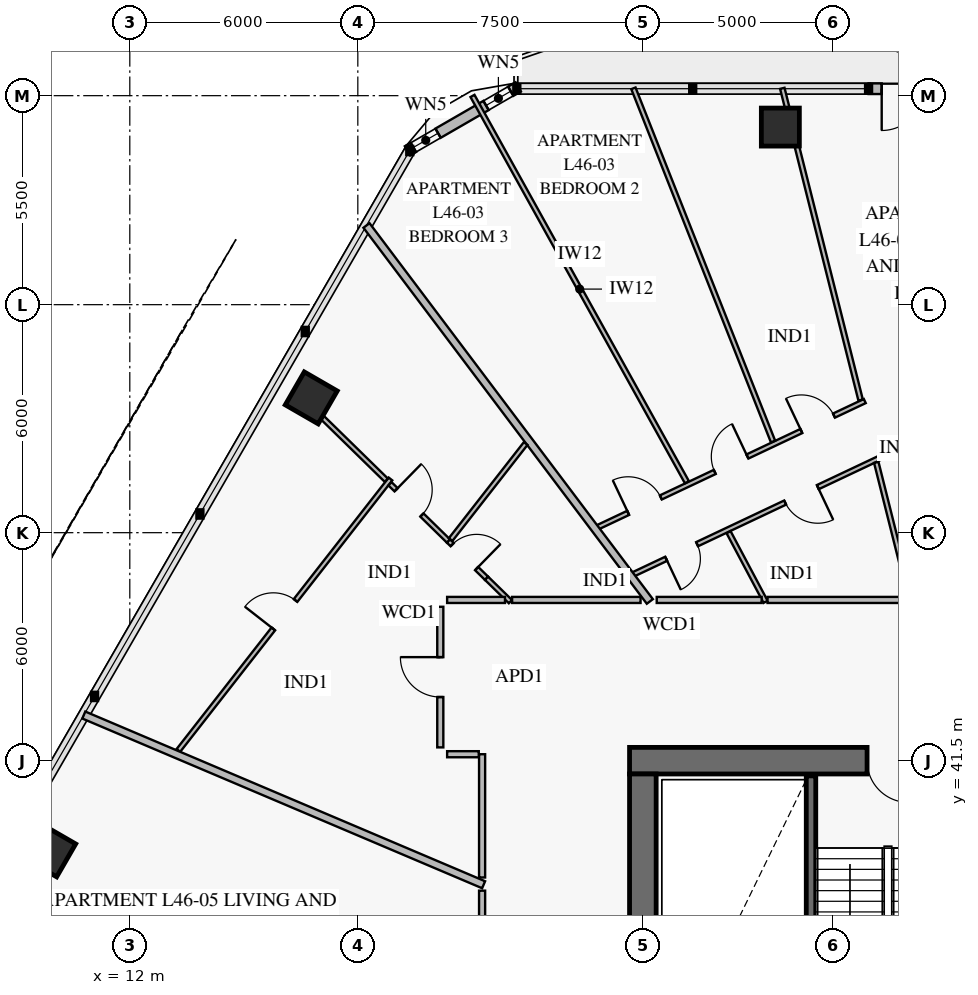
"""IFC4 building model, lengths in metres.
Left out: names, types, materials, properties, quantities, classifications, styles, units other than length and angle.
Written with IfcOpenShell. Run it as: python <this file> out.ifc"""

import sys

from ifc_helpers import new_model, si_unit, direction, frame, frame_2d, origin, origin_2d, place, context, subcontext, project, spatial, rectangle, extrude, element, fill, save


model = new_model("IFC4")
c1 = context("Model", 3, precision=1e-05, world=origin(), true_north=direction((0.0, 1.0)))
c2 = subcontext(c1, "Body", "Model", "MODEL_VIEW")
j1 = project(units=[si_unit("LENGTHUNIT", "METRE"), si_unit("PLANEANGLEUNIT", "RADIAN")], contexts=[c1])
p1 = place(None, origin())
s1 = spatial("IfcSite", under=j1, at=p1, CompositionType="ELEMENT")
p2 = place(p1, origin())
s2 = spatial("IfcBuilding", under=s1, at=p2, CompositionType="ELEMENT")
p3 = place(p2, frame((0.0, 0.0, 184.6)))
s3 = spatial("IfcBuildingStorey", under=s2, at=p3, CompositionType="ELEMENT", Elevation=184.6)
p4 = place(p3, frame((36.75, 41.5, 0.0), z_axis=(0.0, 0.0, 1.0), x_axis=(-1.0, 0.0, 0.0)))
e1 = element("IfcWall", 1, at=p4, inside=s3, PredefinedType="SHEAR", context=c2, shape_type="SweptSolid", body=[
    extrude(rectangle(XDim=11.6, YDim=0.7, at=frame_2d((5.8, 0.0))), origin(), (0.0, 0.0, 1.0), 3.8),
])
p5 = place(p4, frame((4.25, 0.0, 0.0)))
e2 = element("IfcOpeningElement", 2, at=p5, cuts=e1, PredefinedType="OPENING", context=c2, shape_type="SweptSolid", body=[
    extrude(rectangle(XDim=1.1, YDim=2.15, at=frame_2d((0.55, 1.075))), frame((0.0, 0.362, 0.0), z_axis=(0.0, -1.0, 0.0), x_axis=(1.0, 0.0, 0.0)), (0.0, 0.0, 1.0), 0.724),
])
p6 = place(p3, frame((25.5, 22.85, 0.0), z_axis=(0.0, 0.0, 1.0), x_axis=(0.0, 1.0, 0.0)))
e3 = element("IfcWall", 3, at=p6, inside=s3, PredefinedType="SHEAR", context=c2, shape_type="SweptSolid", body=[
    extrude(rectangle(XDim=18.3, YDim=0.7, at=frame_2d((9.15, 0.0))), origin(), (0.0, 0.0, 1.0), 3.8),
])
p7 = place(p6, frame((8.9, 0.0, 0.0)))
e4 = element("IfcOpeningElement", 4, at=p7, cuts=e3, PredefinedType="OPENING", context=c2, shape_type="SweptSolid", body=[
    extrude(rectangle(XDim=1.1, YDim=2.15, at=frame_2d((0.55, 1.075))), frame((0.0, 0.362, 0.0), z_axis=(0.0, -1.0, 0.0), x_axis=(1.0, 0.0, 0.0)), (0.0, 0.0, 1.0), 0.724),
])
for number, where, z_axis, x_axis in (
    (5, (29.118, 58.173, 0.0), (0.0, 0.0, 1.0), (-1.0, 0.0, 0.0)),
    (6, (16.774, 51.047, 0.0), (0.0, 0.0, 1.0), (-0.5, -0.866, 0.0)),
    (7, (9.892, 39.126, 0.0), (0.0, 0.0, 1.0), (-0.5, -0.866, 0.0)),
):
    element("IfcColumn", number, at=place(p3, frame(where, z_axis=z_axis, x_axis=x_axis)), inside=s3, PredefinedType="COLUMN", context=c2, shape_type="SweptSolid", body=[
        extrude(rectangle(XDim=1.0, YDim=1.0, at=origin_2d()), origin(), (0.0, 0.0, 1.0), 3.55),
    ])
p8 = place(p3, frame((19.307, 57.548, 0.0), z_axis=(0.0, 0.0, 1.0), x_axis=(0.866020068361, 0.500009241111, 0.0)))
e8 = element("IfcWall", 8, at=p8, inside=s3, PredefinedType="SOLIDWALL", context=c2, shape_type="SweptSolid", body=[
    extrude(rectangle(XDim=3.365, YDim=0.28, at=frame_2d((1.683, 0.0))), origin(), (0.0, 0.0, 1.0), 3.55),
])
p9 = place(p8, frame((2.387, 0.0, 0.85)))
e9 = element("IfcOpeningElement", 9, at=p9, cuts=e8, PredefinedType="OPENING", context=c2, shape_type="SweptSolid", body=[
    extrude(rectangle(XDim=0.75, YDim=1.5, at=frame_2d((0.375, 0.75))), frame((0.0, 0.152, 0.0), z_axis=(0.0, -1.0, 0.0), x_axis=(1.0, 0.0, 0.0)), (0.0, 0.0, 1.0), 0.304),
])
p10 = place(p8, frame((0.179, 0.0, 0.85)))
e10 = element("IfcOpeningElement", 10, at=p10, cuts=e8, PredefinedType="OPENING", context=c2, shape_type="SweptSolid", body=[
    extrude(rectangle(XDim=0.75, YDim=1.5, at=frame_2d((0.375, 0.75))), frame((0.0, 0.152, 0.0), z_axis=(0.0, -1.0, 0.0), x_axis=(1.0, 0.0, 0.0)), (0.0, 0.0, 1.0), 0.304),
])
p11 = place(p3, frame((31.44, 59.183, 0.0), z_axis=(0.0, 0.0, 1.0), x_axis=(1.0, 0.0, 0.0)))
e11 = element("IfcWall", 11, at=p11, inside=s3, PredefinedType="SOLIDWALL", context=c2, shape_type="SweptSolid", body=[
    extrude(rectangle(XDim=1.79, YDim=0.28, at=frame_2d((0.895, 0.0))), origin(), (0.0, 0.0, 1.0), 3.55),
])
p12 = place(p11, frame((0.345, 0.0, 0.0)))
e12 = element("IfcOpeningElement", 12, at=p12, cuts=e11, PredefinedType="OPENING", context=c2, shape_type="SweptSolid", body=[
    extrude(rectangle(XDim=1.1, YDim=2.2, at=frame_2d((0.55, 1.1))), frame((0.0, 0.152, 0.0), z_axis=(0.0, -1.0, 0.0), x_axis=(1.0, 0.0, 0.0)), (0.0, 0.0, 1.0), 0.304),
])
p13 = place(p3, frame((29.925, 31.4, 0.0), z_axis=(0.0, 0.0, 1.0), x_axis=(0.0, 1.0, 0.0)))
e13 = element("IfcWall", 13, at=p13, inside=s3, PredefinedType="SOLIDWALL", context=c2, shape_type="SweptSolid", body=[
    extrude(rectangle(XDim=9.7, YDim=0.25, at=frame_2d((4.85, 0.0))), origin(), (0.0, 0.0, 1.0), 3.8),
])
p14 = place(p3, frame((31.717, 49.461, 0.0), z_axis=(0.0, 0.0, 1.0), x_axis=(-0.904083014939, -0.427356879081, 0.0)))
e14 = element("IfcWall", 14, at=p14, inside=s3, PredefinedType="PARTITIONING", context=c2, shape_type="SweptSolid", body=[
    extrude(rectangle(XDim=7.18, YDim=0.12, at=frame_2d((3.59, 0.0))), origin(), (0.0, 0.0, 1.0), 2.9),
])
p15 = place(p14, frame((1.785, 0.0, 0.0)))
e15 = element("IfcOpeningElement", 15, at=p15, cuts=e14, PredefinedType="OPENING", context=c2, shape_type="SweptSolid", body=[
    extrude(rectangle(XDim=0.95, YDim=2.1, at=frame_2d((0.475, 1.05))), frame((0.0, 0.072, 0.0), z_axis=(0.0, -1.0, 0.0), x_axis=(1.0, 0.0, 0.0)), (0.0, 0.0, 1.0), 0.144),
])
p16 = place(p14, frame((5.298, 0.0, 0.0)))
e16 = element("IfcOpeningElement", 16, at=p16, cuts=e14, PredefinedType="OPENING", context=c2, shape_type="SweptSolid", body=[
    extrude(rectangle(XDim=0.9, YDim=2.1, at=frame_2d((0.45, 1.05))), frame((0.0, 0.072, 0.0), z_axis=(0.0, -1.0, 0.0), x_axis=(1.0, 0.0, 0.0)), (0.0, 0.0, 1.0), 0.144),
])
p17 = place(p3, frame((31.34, 50.964, 0.0), z_axis=(0.0, 0.0, 1.0), x_axis=(-0.904072927677, -0.427378218258, 0.0)))
e17 = element("IfcWall", 17, at=p17, inside=s3, PredefinedType="PARTITIONING", context=c2, shape_type="SweptSolid", body=[
    extrude(rectangle(XDim=7.782, YDim=0.12, at=frame_2d((3.891, 0.0))), origin(), (0.0, 0.0, 1.0), 2.9),
])
p18 = place(p17, frame((0.896, 0.0, 0.0)))
e18 = element("IfcOpeningElement", 18, at=p18, cuts=e17, PredefinedType="OPENING", context=c2, shape_type="SweptSolid", body=[
    extrude(rectangle(XDim=0.95, YDim=2.1, at=frame_2d((0.475, 1.05))), frame((0.0, 0.072, 0.0), z_axis=(0.0, -1.0, 0.0), x_axis=(1.0, 0.0, 0.0)), (0.0, 0.0, 1.0), 0.144),
])
p19 = place(p17, frame((3.416, 0.0, 0.0)))
e19 = element("IfcOpeningElement", 19, at=p19, cuts=e17, PredefinedType="OPENING", context=c2, shape_type="SweptSolid", body=[
    extrude(rectangle(XDim=0.95, YDim=2.1, at=frame_2d((0.475, 1.05))), frame((0.0, 0.072, 0.0), z_axis=(0.0, -1.0, 0.0), x_axis=(1.0, 0.0, 0.0)), (0.0, 0.0, 1.0), 0.144),
])
p20 = place(p17, frame((5.936, 0.0, 0.0)))
e20 = element("IfcOpeningElement", 20, at=p20, cuts=e17, PredefinedType="OPENING", context=c2, shape_type="SweptSolid", body=[
    extrude(rectangle(XDim=0.95, YDim=2.1, at=frame_2d((0.475, 1.05))), frame((0.0, 0.072, 0.0), z_axis=(0.0, -1.0, 0.0), x_axis=(1.0, 0.0, 0.0)), (0.0, 0.0, 1.0), 0.144),
])
p21 = place(p3, frame((18.86, 48.913, 0.0), z_axis=(0.0, 0.0, 1.0), x_axis=(-0.615647177954, -0.788021923729, 0.0)))
e21 = element("IfcWall", 21, at=p21, inside=s3, PredefinedType="PARTITIONING", context=c2, shape_type="SweptSolid", body=[
    extrude(rectangle(XDim=9.064, YDim=0.12, at=frame_2d((4.532, 0.0))), origin(), (0.0, 0.0, 1.0), 2.9),
])
p22 = place(p21, frame((4.057, 0.0, 0.0)))
e22 = element("IfcOpeningElement", 22, at=p22, cuts=e21, PredefinedType="OPENING", context=c2, shape_type="SweptSolid", body=[
    extrude(rectangle(XDim=0.95, YDim=2.1, at=frame_2d((0.475, 1.05))), frame((0.0, 0.072, 0.0), z_axis=(0.0, -1.0, 0.0), x_axis=(1.0, 0.0, 0.0)), (0.0, 0.0, 1.0), 0.144),
])
p23 = place(p3, frame((21.387, 46.3, 0.0), z_axis=(0.0, 0.0, 1.0), x_axis=(-0.714709414699, 0.699421512781, 0.0)))
e23 = element("IfcWall", 23, at=p23, inside=s3, PredefinedType="PARTITIONING", context=c2, shape_type="SweptSolid", body=[
    extrude(rectangle(XDim=1.405, YDim=0.12, at=frame_2d((0.703, 0.0))), origin(), (0.0, 0.0, 1.0), 2.9),
])
p24 = place(p23, frame((0.365, 0.0, 0.0)))
e24 = element("IfcOpeningElement", 24, at=p24, cuts=e23, PredefinedType="OPENING", context=c2, shape_type="SweptSolid", body=[
    extrude(rectangle(XDim=0.9, YDim=2.1, at=frame_2d((0.45, 1.05))), frame((0.0, 0.072, 0.0), z_axis=(0.0, -1.0, 0.0), x_axis=(1.0, 0.0, 0.0)), (0.0, 0.0, 1.0), 0.144),
])
p25 = place(p3, frame((20.383, 47.283, 0.0), z_axis=(0.0, 0.0, 1.0), x_axis=(-0.714732795813, 0.699397619806, 0.0)))
e25 = element("IfcWall", 25, at=p25, inside=s3, PredefinedType="PARTITIONING", context=c2, shape_type="SweptSolid", body=[
    extrude(rectangle(XDim=2.149, YDim=0.12, at=frame_2d((1.075, 0.0))), origin(), (0.0, 0.0, 1.0), 2.9),
])
p26 = place(p25, frame((0.975, 0.0, 0.0)))
e26 = element("IfcOpeningElement", 26, at=p26, cuts=e25, PredefinedType="OPENING", context=c2, shape_type="SweptSolid", body=[
    extrude(rectangle(XDim=0.95, YDim=2.1, at=frame_2d((0.475, 1.05))), frame((0.0, 0.072, 0.0), z_axis=(0.0, -1.0, 0.0), x_axis=(1.0, 0.0, 0.0)), (0.0, 0.0, 1.0), 0.144),
])
p27 = place(p3, frame((18.749, 48.882, 0.0), z_axis=(0.0, 0.0, 1.0), x_axis=(-0.714696370735, 0.69943484161, 0.0)))
e27 = element("IfcWall", 27, at=p27, inside=s3, PredefinedType="PARTITIONING", context=c2, shape_type="SweptSolid", body=[
    extrude(rectangle(XDim=2.352, YDim=0.12, at=frame_2d((1.176, 0.0))), origin(), (0.0, 0.0, 1.0), 2.9),
])
p28 = place(p3, frame((20.17, 45.55, 0.0), z_axis=(0.0, 0.0, 1.0), x_axis=(0.0, -1.0, 0.0)))
e28 = element("IfcWall", 28, at=p28, inside=s3, PredefinedType="PARTITIONING", context=c2, shape_type="SweptSolid", body=[
    extrude(rectangle(XDim=3.7, YDim=0.16, at=frame_2d((1.85, 0.0))), origin(), (0.0, 0.0, 1.0), 3.15),
])
p29 = place(p28, frame((1.325, 0.0, 0.0)))
e29 = element("IfcOpeningElement", 29, at=p29, cuts=e28, PredefinedType="OPENING", context=c2, shape_type="SweptSolid", body=[
    extrude(rectangle(XDim=1.05, YDim=2.15, at=frame_2d((0.525, 1.075))), frame((0.0, 0.092, 0.0), z_axis=(0.0, -1.0, 0.0), x_axis=(1.0, 0.0, 0.0)), (0.0, 0.0, 1.0), 0.184),
])
p30 = place(p3, frame((21.27, 38.08, 0.0), z_axis=(0.0, 0.0, 1.0), x_axis=(0.0, -1.0, 0.0)))
e30 = element("IfcWall", 30, at=p30, inside=s3, PredefinedType="PARTITIONING", context=c2, shape_type="SweptSolid", body=[
    extrude(rectangle(XDim=3.679, YDim=0.16, at=frame_2d((1.839, 0.0))), origin(), (0.0, 0.0, 1.0), 2.9),
])
p31 = place(p30, frame((1.314, 0.0, 0.0)))
e31 = element("IfcOpeningElement", 31, at=p31, cuts=e30, PredefinedType="OPENING", context=c2, shape_type="SweptSolid", body=[
    extrude(rectangle(XDim=1.05, YDim=2.15, at=frame_2d((0.525, 1.075))), frame((0.0, 0.092, 0.0), z_axis=(0.0, -1.0, 0.0), x_axis=(1.0, 0.0, 0.0)), (0.0, 0.0, 1.0), 0.184),
])
p32 = place(p3, frame((28.73, 45.68, 0.0), z_axis=(0.0, 0.0, 1.0), x_axis=(-0.469275581214, 0.883051770213, 0.0)))
e32 = element("IfcWall", 32, at=p32, inside=s3, PredefinedType="PARTITIONING", context=c2, shape_type="SweptSolid", body=[
    extrude(rectangle(XDim=2.076, YDim=0.12, at=frame_2d((1.038, 0.0))), origin(), (0.0, 0.0, 1.0), 3.55),
])
p33 = place(p3, frame((28.926, 49.898, 0.0), z_axis=(0.0, 0.0, 1.0), x_axis=(-0.367601408751, 0.929983443016, 0.0)))
e33 = element("IfcWall", 33, at=p33, inside=s3, PredefinedType="PARTITIONING", context=c2, shape_type="SweptSolid", body=[
    extrude(rectangle(XDim=9.995, YDim=0.12, at=frame_2d((4.997, 0.0))), origin(), (0.0, 0.0, 1.0), 2.87),
])
p34 = place(p3, frame((26.66, 48.827, 0.0), z_axis=(0.0, 0.0, 1.0), x_axis=(-0.485325552843, 0.874333522037, 0.0)))
e34 = element("IfcWall", 34, at=p34, inside=s3, PredefinedType="PARTITIONING", context=c2, shape_type="SweptSolid", body=[
    extrude(rectangle(XDim=11.627, YDim=0.12, at=frame_2d((5.813, 0.0))), origin(), (0.0, 0.0, 1.0), 2.87),
])
p35 = place(p3, frame((32.564, 45.681, 0.0), z_axis=(0.0, 0.0, 1.0), x_axis=(-0.24365901467, 0.969860961463, 0.0)))
e35 = element("IfcWall", 35, at=p35, inside=s3, PredefinedType="PARTITIONING", context=c2, shape_type="SweptSolid", body=[
    extrude(rectangle(XDim=3.783, YDim=0.12, at=frame_2d((1.892, 0.0))), origin(), (0.0, 0.0, 1.0), 2.9),
])
p36 = place(p3, frame((31.231, 50.988, 0.0), z_axis=(0.0, 0.0, 1.0), x_axis=(-0.243630476545, 0.969868130675, 0.0)))
e36 = element("IfcWall", 36, at=p36, inside=s3, PredefinedType="PARTITIONING", context=c2, shape_type="SweptSolid", body=[
    extrude(rectangle(XDim=6.872, YDim=0.12, at=frame_2d((3.436, 0.0))), origin(), (0.0, 0.0, 1.0), 2.9),
])
p37 = place(p3, frame((29.295, 58.693, 0.0), z_axis=(0.0, 0.0, 1.0), x_axis=(-0.243426992513, 0.969919223088, 0.0)))
e37 = element("IfcWall", 37, at=p37, inside=s3, PredefinedType="PARTITIONING", context=c2, shape_type="SweptSolid", body=[
    extrude(rectangle(XDim=0.516, YDim=0.12, at=frame_2d((0.258, 0.0))), origin(), (0.0, 0.0, 1.0), 3.55),
])
p38 = place(p3, frame((25.684, 45.69, 0.0), z_axis=(0.0, 0.0, 1.0), x_axis=(-0.601811441108, 0.798638209299, 0.0)))
e38 = element("IfcWall", 38, at=p38, inside=s3, PredefinedType="PARTITIONING", context=c2, shape_type="SweptSolid", body=[
    extrude(rectangle(XDim=12.389, YDim=0.2, at=frame_2d((6.194, 0.0))), origin(), (0.0, 0.0, 1.0), 2.87),
])
p39 = place(p3, frame((22.016, 45.685, 0.0), z_axis=(0.0, 0.0, 1.0), x_axis=(-0.714701250038, 0.699429855807, 0.0)))
e39 = element("IfcWall", 39, at=p39, inside=s3, PredefinedType="PARTITIONING", context=c2, shape_type="SweptSolid", body=[
    extrude(rectangle(XDim=0.879, YDim=0.12, at=frame_2d((0.44, 0.0))), origin(), (0.0, 0.0, 1.0), 2.9),
])
p40 = place(p3, frame((22.417, 49.846, 0.0), z_axis=(0.0, 0.0, 1.0), x_axis=(-0.615599713935, -0.788059002996, 0.0)))
e40 = element("IfcWall", 40, at=p40, inside=s3, PredefinedType="PARTITIONING", context=c2, shape_type="SweptSolid", body=[
    extrude(rectangle(XDim=3.207, YDim=0.12, at=frame_2d((1.603, 0.0))), origin(), (0.0, 0.0, 1.0), 2.9),
])
p41 = place(p3, frame((21.31, 38.236, 0.0), z_axis=(0.0, 0.0, 1.0), x_axis=(-0.920512876962, 0.390712225746, 0.0)))
e41 = element("IfcWall", 41, at=p41, inside=s3, PredefinedType="PARTITIONING", context=c2, shape_type="SweptSolid", body=[
    extrude(rectangle(XDim=11.429, YDim=0.2, at=frame_2d((5.714, 0.0))), origin(), (0.0, 0.0, 1.0), 2.87),
])
p42 = place(p3, frame((32.481, 45.73, 0.0), z_axis=(0.0, 0.0, 1.0), x_axis=(-1.0, 0.0, 0.0)))
e42 = element("IfcWall", 42, at=p42, inside=s3, PredefinedType="PARTITIONING", context=c2, shape_type="SweptSolid", body=[
    extrude(rectangle(XDim=3.701, YDim=0.16, at=frame_2d((1.851, 0.0))), origin(), (0.0, 0.0, 1.0), 2.9),
])
p43 = place(p3, frame((28.626, 45.73, 0.0), z_axis=(0.0, 0.0, 1.0), x_axis=(-1.0, 0.0, 0.0)))
e43 = element("IfcWall", 43, at=p43, inside=s3, PredefinedType="PARTITIONING", context=c2, shape_type="SweptSolid", body=[
    extrude(rectangle(XDim=2.761, YDim=0.16, at=frame_2d((1.38, 0.0))), origin(), (0.0, 0.0, 1.0), 3.55),
])
p44 = place(p3, frame((21.27, 41.67, 0.0), z_axis=(0.0, 0.0, 1.0), x_axis=(0.0, -1.0, 0.0)))
e44 = element("IfcWall", 44, at=p44, inside=s3, PredefinedType="PARTITIONING", context=c2, shape_type="SweptSolid", body=[
    extrude(rectangle(XDim=3.243, YDim=0.16, at=frame_2d((1.622, 0.0))), origin(), (0.0, 0.0, 1.0), 3.55),
])
p45 = place(p3, frame((21.872, 45.73, 0.0), z_axis=(0.0, 0.0, 1.0), x_axis=(-1.0, 0.0, 0.0)))
e45 = element("IfcWall", 45, at=p45, inside=s3, PredefinedType="PARTITIONING", context=c2, shape_type="SweptSolid", body=[
    extrude(rectangle(XDim=1.522, YDim=0.16, at=frame_2d((0.761, 0.0))), origin(), (0.0, 0.0, 1.0), 3.15),
])
p46 = place(p3, frame((20.35, 41.67, 0.0), z_axis=(0.0, 0.0, 1.0), x_axis=(1.0, 0.0, 0.0)))
e46 = element("IfcWall", 46, at=p46, inside=s3, PredefinedType="PARTITIONING", context=c2, shape_type="SweptSolid", body=[
    extrude(rectangle(XDim=0.832, YDim=0.16, at=frame_2d((0.416, 0.0))), origin(), (0.0, 0.0, 1.0), 3.55),
])
p47 = place(p3, frame((25.439, 45.73, 0.0), z_axis=(0.0, 0.0, 1.0), x_axis=(-1.0, 0.0, 0.0)))
e47 = element("IfcWall", 47, at=p47, inside=s3, PredefinedType="PARTITIONING", context=c2, shape_type="SweptSolid", body=[
    extrude(rectangle(XDim=3.38, YDim=0.16, at=frame_2d((1.69, 0.0))), origin(), (0.0, 0.0, 1.0), 2.9),
])
p48 = place(p9, origin())
e48 = element("IfcWindow", 48, at=p48, inside=s3, PartitioningType="SINGLE_PANEL", PredefinedType="WINDOW", context=c2, shape_type="SweptSolid", body=[
    extrude(rectangle(XDim=0.75, YDim=1.5, at=frame_2d((0.375, 0.75))), frame((0.0, 0.03, 0.0), z_axis=(0.0, -1.0, 0.0), x_axis=(1.0, 0.0, 0.0)), (0.0, 0.0, 1.0), 0.06),
])
fill(e9, e48)
p49 = place(p10, origin())
e49 = element("IfcWindow", 49, at=p49, inside=s3, PartitioningType="SINGLE_PANEL", PredefinedType="WINDOW", context=c2, shape_type="SweptSolid", body=[
    extrude(rectangle(XDim=0.75, YDim=1.5, at=frame_2d((0.375, 0.75))), frame((0.0, 0.03, 0.0), z_axis=(0.0, -1.0, 0.0), x_axis=(1.0, 0.0, 0.0)), (0.0, 0.0, 1.0), 0.06),
])
fill(e10, e49)
p50 = place(p12, frame((1.1, 0.0, 0.0), z_axis=(0.0, 0.0, 1.0), x_axis=(-1.0, 0.0, 0.0)))
e50 = element("IfcDoor", 50, at=p50, inside=s3, OperationType="SINGLE_SWING_RIGHT", PredefinedType="DOOR", context=c2, shape_type="SweptSolid", body=[
    extrude(rectangle(XDim=1.1, YDim=2.2, at=frame_2d((0.55, 1.1))), frame((0.0, 0.025, 0.0), z_axis=(0.0, -1.0, 0.0), x_axis=(1.0, 0.0, 0.0)), (0.0, 0.0, 1.0), 0.05),
])
fill(e12, e50)
p51 = place(p5, origin())
e51 = element("IfcDoor", 51, at=p51, inside=s3, OperationType="SINGLE_SWING_LEFT", PredefinedType="USERDEFINED", context=c2, shape_type="SweptSolid", body=[
    extrude(rectangle(XDim=1.1, YDim=2.15, at=frame_2d((0.55, 1.075))), frame((0.0, 0.025, 0.0), z_axis=(0.0, -1.0, 0.0), x_axis=(1.0, 0.0, 0.0)), (0.0, 0.0, 1.0), 0.05),
])
fill(e2, e51)
p52 = place(p15, origin())
e52 = element("IfcDoor", 52, at=p52, inside=s3, OperationType="SINGLE_SWING_LEFT", PredefinedType="DOOR", context=c2, shape_type="SweptSolid", body=[
    extrude(rectangle(XDim=0.95, YDim=2.1, at=frame_2d((0.475, 1.05))), frame((0.0, 0.025, 0.0), z_axis=(0.0, -1.0, 0.0), x_axis=(1.0, 0.0, 0.0)), (0.0, 0.0, 1.0), 0.05),
])
fill(e15, e52)
p53 = place(p16, origin())
e53 = element("IfcDoor", 53, at=p53, inside=s3, OperationType="SINGLE_SWING_RIGHT", PredefinedType="DOOR", context=c2, shape_type="SweptSolid", body=[
    extrude(rectangle(XDim=0.9, YDim=2.1, at=frame_2d((0.45, 1.05))), frame((0.0, 0.025, 0.0), z_axis=(0.0, -1.0, 0.0), x_axis=(1.0, 0.0, 0.0)), (0.0, 0.0, 1.0), 0.05),
])
fill(e16, e53)
p54 = place(p18, frame((0.95, 0.0, 0.0), z_axis=(0.0, 0.0, 1.0), x_axis=(-1.0, 0.0, 0.0)))
e54 = element("IfcDoor", 54, at=p54, inside=s3, OperationType="SINGLE_SWING_LEFT", PredefinedType="DOOR", context=c2, shape_type="SweptSolid", body=[
    extrude(rectangle(XDim=0.95, YDim=2.1, at=frame_2d((0.475, 1.05))), frame((0.0, 0.025, 0.0), z_axis=(0.0, -1.0, 0.0), x_axis=(1.0, 0.0, 0.0)), (0.0, 0.0, 1.0), 0.05),
])
fill(e18, e54)
p55 = place(p19, frame((0.95, 0.0, 0.0), z_axis=(0.0, 0.0, 1.0), x_axis=(-1.0, 0.0, 0.0)))
e55 = element("IfcDoor", 55, at=p55, inside=s3, OperationType="SINGLE_SWING_RIGHT", PredefinedType="DOOR", context=c2, shape_type="SweptSolid", body=[
    extrude(rectangle(XDim=0.95, YDim=2.1, at=frame_2d((0.475, 1.05))), frame((0.0, 0.025, 0.0), z_axis=(0.0, -1.0, 0.0), x_axis=(1.0, 0.0, 0.0)), (0.0, 0.0, 1.0), 0.05),
])
fill(e19, e55)
p56 = place(p20, frame((0.95, 0.0, 0.0), z_axis=(0.0, 0.0, 1.0), x_axis=(-1.0, 0.0, 0.0)))
e56 = element("IfcDoor", 56, at=p56, inside=s3, OperationType="SINGLE_SWING_LEFT", PredefinedType="DOOR", context=c2, shape_type="SweptSolid", body=[
    extrude(rectangle(XDim=0.95, YDim=2.1, at=frame_2d((0.475, 1.05))), frame((0.0, 0.025, 0.0), z_axis=(0.0, -1.0, 0.0), x_axis=(1.0, 0.0, 0.0)), (0.0, 0.0, 1.0), 0.05),
])
fill(e20, e56)
p57 = place(p22, frame((0.95, 0.0, 0.0), z_axis=(0.0, 0.0, 1.0), x_axis=(-1.0, 0.0, 0.0)))
e57 = element("IfcDoor", 57, at=p57, inside=s3, OperationType="SINGLE_SWING_LEFT", PredefinedType="DOOR", context=c2, shape_type="SweptSolid", body=[
    extrude(rectangle(XDim=0.95, YDim=2.1, at=frame_2d((0.475, 1.05))), frame((0.0, 0.025, 0.0), z_axis=(0.0, -1.0, 0.0), x_axis=(1.0, 0.0, 0.0)), (0.0, 0.0, 1.0), 0.05),
])
fill(e22, e57)
p58 = place(p24, frame((0.9, 0.0, 0.0), z_axis=(0.0, 0.0, 1.0), x_axis=(-1.0, 0.0, 0.0)))
e58 = element("IfcDoor", 58, at=p58, inside=s3, OperationType="SINGLE_SWING_RIGHT", PredefinedType="DOOR", context=c2, shape_type="SweptSolid", body=[
    extrude(rectangle(XDim=0.9, YDim=2.1, at=frame_2d((0.45, 1.05))), frame((0.0, 0.025, 0.0), z_axis=(0.0, -1.0, 0.0), x_axis=(1.0, 0.0, 0.0)), (0.0, 0.0, 1.0), 0.05),
])
fill(e24, e58)
p59 = place(p26, frame((0.95, 0.0, 0.0), z_axis=(0.0, 0.0, 1.0), x_axis=(-1.0, 0.0, 0.0)))
e59 = element("IfcDoor", 59, at=p59, inside=s3, OperationType="SINGLE_SWING_LEFT", PredefinedType="DOOR", context=c2, shape_type="SweptSolid", body=[
    extrude(rectangle(XDim=0.95, YDim=2.1, at=frame_2d((0.475, 1.05))), frame((0.0, 0.025, 0.0), z_axis=(0.0, -1.0, 0.0), x_axis=(1.0, 0.0, 0.0)), (0.0, 0.0, 1.0), 0.05),
])
fill(e26, e59)
p60 = place(p29, frame((1.05, 0.0, 0.0), z_axis=(0.0, 0.0, 1.0), x_axis=(-1.0, 0.0, 0.0)))
e60 = element("IfcDoor", 60, at=p60, inside=s3, OperationType="SINGLE_SWING_RIGHT", PredefinedType="DOOR", context=c2, shape_type="SweptSolid", body=[
    extrude(rectangle(XDim=1.05, YDim=2.15, at=frame_2d((0.525, 1.075))), frame((0.0, 0.025, 0.0), z_axis=(0.0, -1.0, 0.0), x_axis=(1.0, 0.0, 0.0)), (0.0, 0.0, 1.0), 0.05),
])
fill(e29, e60)
save(model, sys.argv[1])
